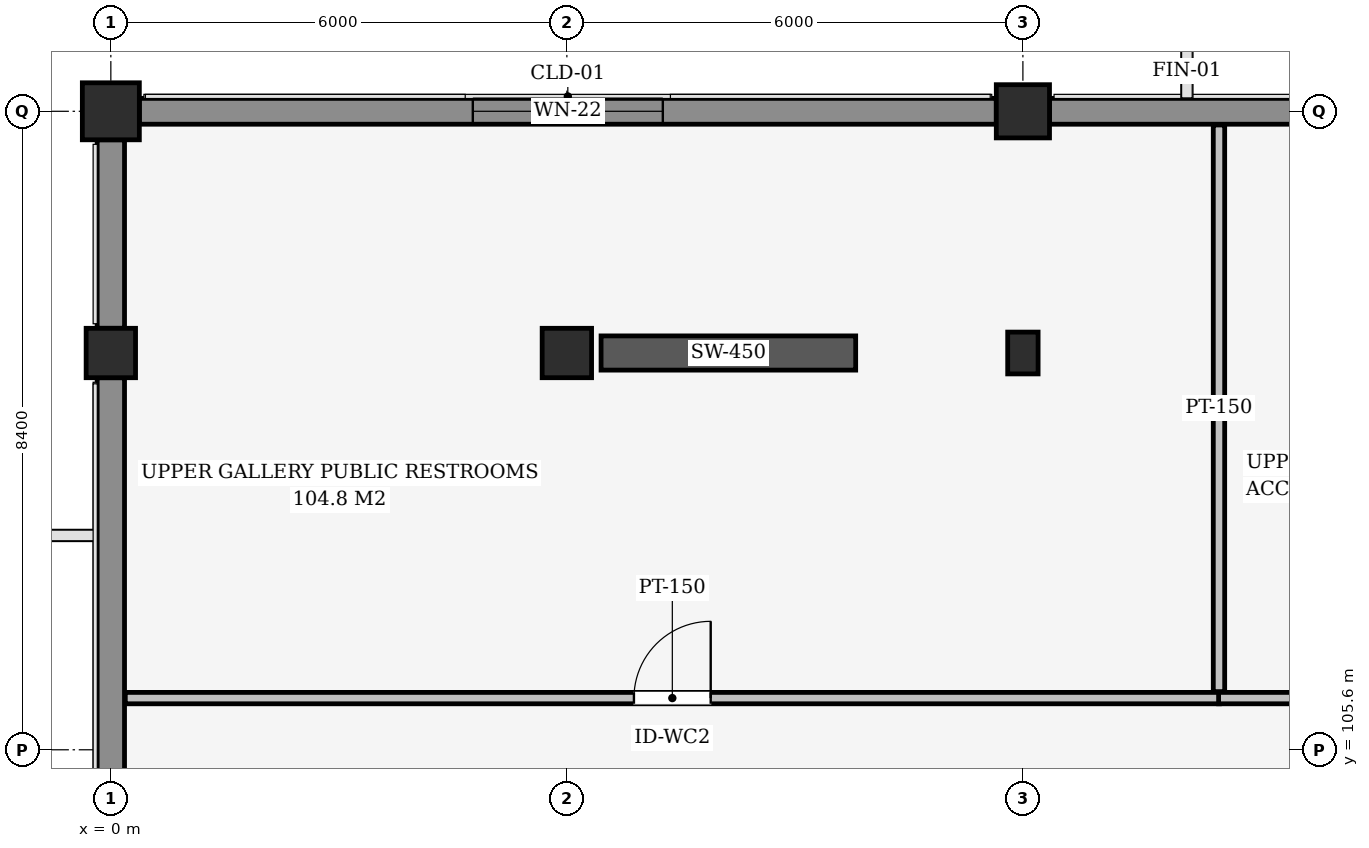
"""IFC4 building model, lengths in metres.
Left out: names, types, materials, properties, quantities, classifications, styles, units other than length and angle.
Written with IfcOpenShell. Run it as: python <this file> out.ifc"""

import sys

from ifc_helpers import new_model, si_unit, direction, frame, frame_2d, origin, origin_2d, place, context, subcontext, project, spatial, rectangle, extrude, element, fill, save


model = new_model("IFC4")
c1 = context("Model", 3, precision=1e-05, world=origin(), true_north=direction((0.0, 1.0)))
c2 = subcontext(c1, "Body", "Model", "MODEL_VIEW")
j1 = project(units=[si_unit("LENGTHUNIT", "METRE"), si_unit("PLANEANGLEUNIT", "RADIAN")], contexts=[c1])
p1 = place(None, origin())
s1 = spatial("IfcSite", under=j1, at=p1, CompositionType="ELEMENT")
p2 = place(p1, origin())
s2 = spatial("IfcBuilding", under=s1, at=p2, CompositionType="ELEMENT")
p3 = place(p2, frame((0.0, 0.0, 13.8)))
s3 = spatial("IfcBuildingStorey", under=s2, at=p3, CompositionType="ELEMENT", Elevation=13.8)
p4 = place(p3, frame((0.0, 114.0, 0.0), z_axis=(0.0, 0.0, 1.0), x_axis=(1.0, 0.0, 0.0)))
e1 = element("IfcColumn", 1, at=p4, inside=s3, PredefinedType="COLUMN", context=c2, shape_type="SweptSolid", body=[
    extrude(rectangle(XDim=0.75, YDim=0.75, at=origin_2d()), origin(), (0.0, 0.0, 1.0), 4.5),
])
p5 = place(p3, frame((12.0, 114.0, 0.0), z_axis=(0.0, 0.0, 1.0), x_axis=(1.0, 0.0, 0.0)))
e2 = element("IfcColumn", 2, at=p5, inside=s3, PredefinedType="COLUMN", context=c2, shape_type="SweptSolid", body=[
    extrude(rectangle(XDim=0.7, YDim=0.7, at=origin_2d()), origin(), (0.0, 0.0, 1.0), 4.5),
])
for number, where, z_axis, x_axis in (
    (3, (0.0, 110.82, 0.0), (0.0, 0.0, 1.0), (1.0, 0.0, 0.0)),
    (4, (6.0, 110.82, 0.0), (0.0, 0.0, 1.0), (1.0, 0.0, 0.0)),
):
    element("IfcColumn", number, at=place(p3, frame(where, z_axis=z_axis, x_axis=x_axis)), inside=s3, PredefinedType="COLUMN", context=c2, shape_type="SweptSolid", body=[
        extrude(rectangle(XDim=0.65, YDim=0.65, at=origin_2d()), origin(), (0.0, 0.0, 1.0), 4.5),
    ])
p6 = place(p3, frame((12.0, 110.82, 0.0), z_axis=(0.0, 0.0, 1.0), x_axis=(1.0, 0.0, 0.0)))
e5 = element("IfcColumn", 5, at=p6, inside=s3, PredefinedType="PILASTER", context=c2, shape_type="SweptSolid", body=[
    extrude(rectangle(XDim=0.4, YDim=0.55, at=origin_2d()), origin(), (0.0, 0.0, 1.0), 4.5),
])
p7 = place(p3, frame((6.45, 110.82, 0.0), z_axis=(0.0, 0.0, 1.0), x_axis=(1.0, 0.0, 0.0)))
e6 = element("IfcWall", 6, at=p7, inside=s3, PredefinedType="SHEAR", context=c2, shape_type="SweptSolid", body=[
    extrude(rectangle(XDim=3.35, YDim=0.45, at=frame_2d((1.675, 0.0))), origin(), (0.0, 0.0, 1.0), 3.505),
])
p8 = place(p3, frame((0.375, 114.0, 0.0), z_axis=(0.0, 0.0, 1.0), x_axis=(1.0, 0.0, 0.0)))
e7 = element("IfcWall", 7, at=p8, inside=s3, PredefinedType="SOLIDWALL", context=c2, shape_type="SweptSolid", body=[
    extrude(rectangle(XDim=11.275, YDim=0.34, at=frame_2d((5.637, 0.0))), origin(), (0.0, 0.0, 1.0), 3.569),
])
p9 = place(p8, frame((4.387, 0.0, 0.85)))
e8 = element("IfcOpeningElement", 8, at=p9, cuts=e7, PredefinedType="OPENING", context=c2, shape_type="SweptSolid", body=[
    extrude(rectangle(XDim=2.5, YDim=1.9, at=frame_2d((1.25, 0.95))), frame((0.0, 0.18, 0.0), z_axis=(0.0, -1.0, 0.0), x_axis=(1.0, 0.0, 0.0)), (0.0, 0.0, 1.0), 0.36),
])
p10 = place(p3, frame((12.35, 114.0, 0.0), z_axis=(0.0, 0.0, 1.0), x_axis=(1.0, 0.0, 0.0)))
e9 = element("IfcWall", 9, at=p10, inside=s3, PredefinedType="SOLIDWALL", context=c2, shape_type="SweptSolid", body=[
    extrude(rectangle(XDim=11.3, YDim=0.34, at=frame_2d((5.65, 0.0))), origin(), (0.0, 0.0, 1.0), 3.569),
])
p11 = place(p3, frame((0.0, 97.525, 0.0), z_axis=(0.0, 0.0, 1.0), x_axis=(0.0, 1.0, 0.0)))
e10 = element("IfcWall", 10, at=p11, inside=s3, PredefinedType="SOLIDWALL", context=c2, shape_type="SweptSolid", body=[
    extrude(rectangle(XDim=12.97, YDim=0.36, at=frame_2d((6.485, 0.0))), origin(), (0.0, 0.0, 1.0), 3.569),
])
p12 = place(p11, frame((5.46, 0.0, 0.85)))
e11 = element("IfcOpeningElement", 11, at=p12, cuts=e10, PredefinedType="OPENING", context=c2, shape_type="SweptSolid", body=[
    extrude(rectangle(XDim=2.05, YDim=1.5, at=frame_2d((1.025, 0.75))), frame((0.0, 0.19, 0.0), z_axis=(0.0, -1.0, 0.0), x_axis=(1.0, 0.0, 0.0)), (0.0, 0.0, 1.0), 0.38),
])
p13 = place(p3, frame((0.0, 111.145, 0.0), z_axis=(0.0, 0.0, 1.0), x_axis=(0.0, 1.0, 0.0)))
e12 = element("IfcWall", 12, at=p13, inside=s3, PredefinedType="SOLIDWALL", context=c2, shape_type="SweptSolid", body=[
    extrude(rectangle(XDim=2.48, YDim=0.36, at=frame_2d((1.24, 0.0))), origin(), (0.0, 0.0, 1.0), 3.568),
])
p14 = place(p3, frame((0.19, 106.28, 0.0), z_axis=(0.0, 0.0, 1.0), x_axis=(1.0, 0.0, 0.0)))
e13 = element("IfcWall", 13, at=p14, inside=s3, PredefinedType="PARTITIONING", context=c2, shape_type="SweptSolid", body=[
    extrude(rectangle(XDim=14.395, YDim=0.15, at=frame_2d((7.198, 0.0))), origin(), (0.0, 0.0, 1.0), 4.18),
])
p15 = place(p14, frame((6.692, 0.0, 0.0)))
e14 = element("IfcOpeningElement", 14, at=p15, cuts=e13, PredefinedType="OPENING", context=c2, shape_type="SweptSolid", body=[
    extrude(rectangle(XDim=1.01, YDim=2.1, at=frame_2d((0.505, 1.05))), frame((0.0, 0.085, 0.0), z_axis=(0.0, -1.0, 0.0), x_axis=(1.0, 0.0, 0.0)), (0.0, 0.0, 1.0), 0.17),
])
p16 = place(p3, frame((14.575, 106.28, 0.0), z_axis=(0.0, 0.0, 1.0), x_axis=(1.0, 0.0, 0.0)))
e15 = element("IfcWall", 15, at=p16, inside=s3, PredefinedType="PARTITIONING", context=c2, shape_type="SweptSolid", body=[
    extrude(rectangle(XDim=3.245, YDim=0.15, at=frame_2d((1.623, 0.0))), origin(), (0.0, 0.0, 1.0), 4.18),
])
p17 = place(p16, frame((1.153, 0.0, 0.0)))
e16 = element("IfcOpeningElement", 16, at=p17, cuts=e15, PredefinedType="OPENING", context=c2, shape_type="SweptSolid", body=[
    extrude(rectangle(XDim=0.94, YDim=2.1, at=frame_2d((0.47, 1.05))), frame((0.0, 0.085, 0.0), z_axis=(0.0, -1.0, 0.0), x_axis=(1.0, 0.0, 0.0)), (0.0, 0.0, 1.0), 0.17),
])
p18 = place(p3, frame((14.58, 106.365, 0.0), z_axis=(0.0, 0.0, 1.0), x_axis=(0.0, 1.0, 0.0)))
e17 = element("IfcWall", 17, at=p18, inside=s3, PredefinedType="PARTITIONING", context=c2, shape_type="SweptSolid", body=[
    extrude(rectangle(XDim=7.455, YDim=0.15, at=frame_2d((3.728, 0.0))), origin(), (0.0, 0.0, 1.0), 3.723),
])
p19 = place(p9, origin())
e18 = element("IfcWindow", 18, at=p19, inside=s3, PartitioningType="SINGLE_PANEL", PredefinedType="WINDOW", context=c2, shape_type="SweptSolid", body=[
    extrude(rectangle(XDim=2.5, YDim=1.9, at=frame_2d((1.25, 0.95))), frame((0.0, 0.03, 0.0), z_axis=(0.0, -1.0, 0.0), x_axis=(1.0, 0.0, 0.0)), (0.0, 0.0, 1.0), 0.06),
])
fill(e8, e18)
p20 = place(p15, origin())
e19 = element("IfcDoor", 19, at=p20, inside=s3, OperationType="SINGLE_SWING_RIGHT", PredefinedType="DOOR", context=c2, shape_type="SweptSolid", body=[
    extrude(rectangle(XDim=1.01, YDim=2.1, at=frame_2d((0.505, 1.05))), frame((0.0, 0.025, 0.0), z_axis=(0.0, -1.0, 0.0), x_axis=(1.0, 0.0, 0.0)), (0.0, 0.0, 1.0), 0.05),
])
fill(e14, e19)
save(model, sys.argv[1])
